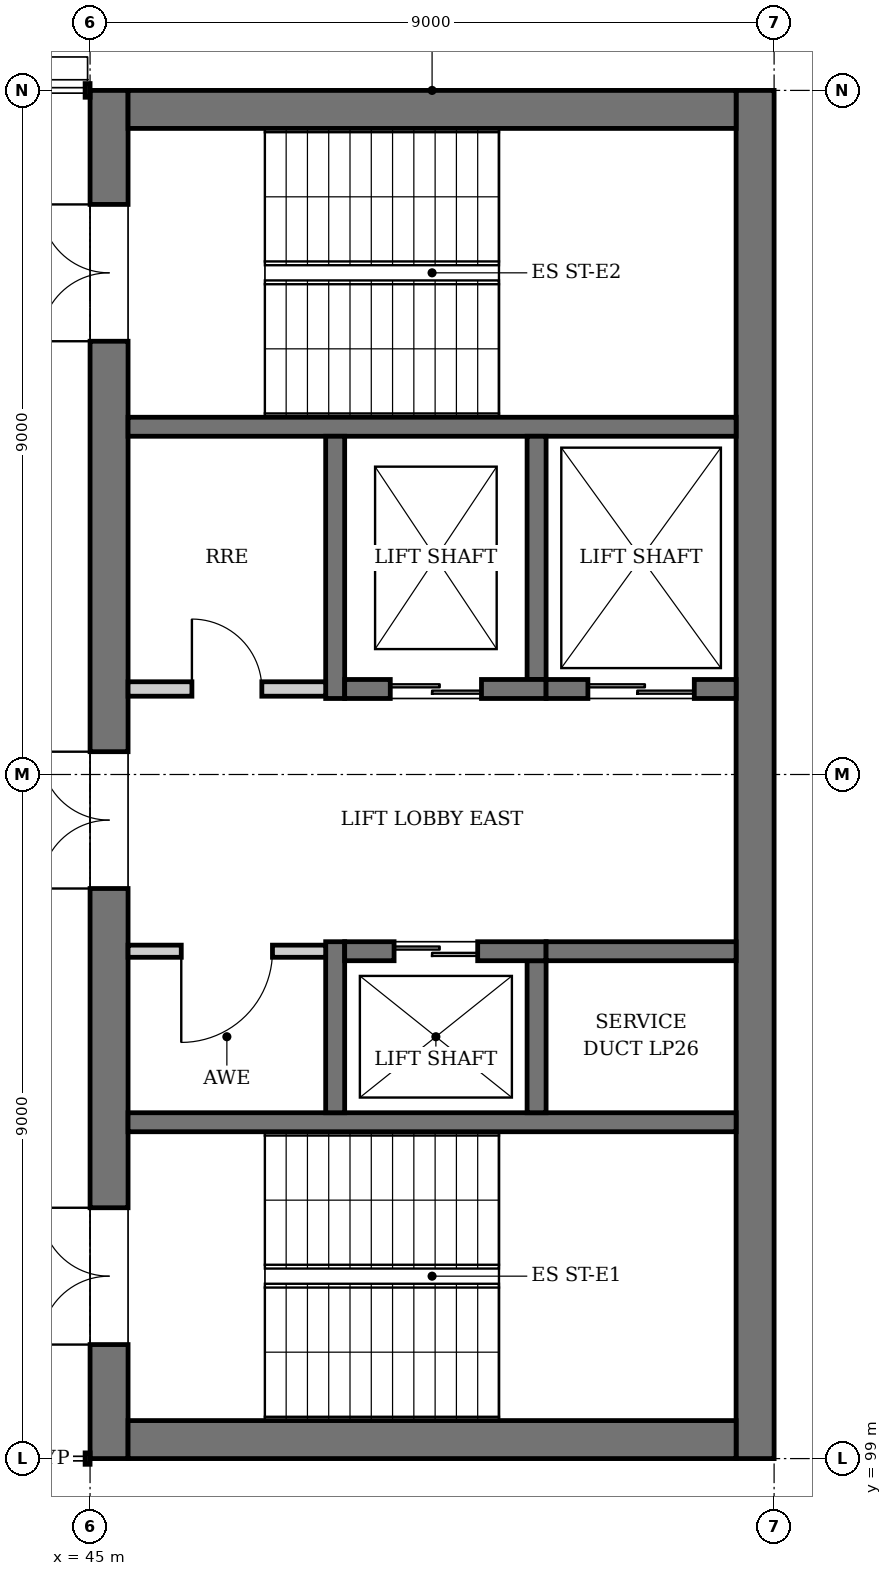
"""IFC4 building model, lengths in metres.
Left out: names, types, materials, properties, quantities, classifications, styles, units other than length and angle.
Written with IfcOpenShell. Run it as: python <this file> out.ifc"""

import sys

from ifc_helpers import new_model, si_unit, direction, frame, frame_2d, origin, place, context, subcontext, project, spatial, rectangle, extrude, element, fill, save


model = new_model("IFC4")
c1 = context("Model", 3, precision=1e-05, world=origin(), true_north=direction((0.0, 1.0)))
c2 = subcontext(c1, "Body", "Model", "MODEL_VIEW")
j1 = project(units=[si_unit("LENGTHUNIT", "METRE"), si_unit("PLANEANGLEUNIT", "RADIAN")], contexts=[c1])
p1 = place(None, origin())
s1 = spatial("IfcSite", under=j1, at=p1, CompositionType="ELEMENT")
p2 = place(p1, origin())
s2 = spatial("IfcBuilding", under=s1, at=p2, CompositionType="ELEMENT")
p3 = place(p2, frame((0.0, 0.0, 59.2)))
s3 = spatial("IfcBuildingStorey", under=s2, at=p3, CompositionType="ELEMENT", Elevation=59.2)
p4 = place(p3, frame((45.25, 99.0, 0.0), z_axis=(0.0, 0.0, 1.0), x_axis=(0.0, 1.0, 0.0)))
e1 = element("IfcWall", 1, at=p4, inside=s3, PredefinedType="SHEAR", context=c2, shape_type="SweptSolid", body=[
    extrude(rectangle(XDim=18.0, YDim=0.5, at=frame_2d((9.0, 0.0))), origin(), (0.0, 0.0, 1.0), 4.0),
])
p5 = place(p4, frame((1.5, 0.0, 0.0)))
e2 = element("IfcOpeningElement", 2, at=p5, cuts=e1, PredefinedType="OPENING", context=c2, shape_type="SweptSolid", body=[
    extrude(rectangle(XDim=1.8, YDim=2.1, at=frame_2d((0.9, 1.05))), frame((0.0, 0.26, 0.0), z_axis=(0.0, -1.0, 0.0), x_axis=(1.0, 0.0, 0.0)), (0.0, 0.0, 1.0), 0.52),
])
p6 = place(p4, frame((14.7, 0.0, 0.0)))
e3 = element("IfcOpeningElement", 3, at=p6, cuts=e1, PredefinedType="OPENING", context=c2, shape_type="SweptSolid", body=[
    extrude(rectangle(XDim=1.8, YDim=2.1, at=frame_2d((0.9, 1.05))), frame((0.0, 0.26, 0.0), z_axis=(0.0, -1.0, 0.0), x_axis=(1.0, 0.0, 0.0)), (0.0, 0.0, 1.0), 0.52),
])
p7 = place(p4, frame((7.5, 0.0, 0.0)))
e4 = element("IfcOpeningElement", 4, at=p7, cuts=e1, PredefinedType="OPENING", context=c2, shape_type="SweptSolid", body=[
    extrude(rectangle(XDim=1.8, YDim=2.1, at=frame_2d((0.9, 1.05))), frame((0.0, 0.26, 0.0), z_axis=(0.0, -1.0, 0.0), x_axis=(1.0, 0.0, 0.0)), (0.0, 0.0, 1.0), 0.52),
])
p8 = place(p3, frame((53.75, 99.0, 0.0), z_axis=(0.0, 0.0, 1.0), x_axis=(0.0, 1.0, 0.0)))
e5 = element("IfcWall", 5, at=p8, inside=s3, PredefinedType="SHEAR", context=c2, shape_type="SweptSolid", body=[
    extrude(rectangle(XDim=18.0, YDim=0.5, at=frame_2d((9.0, 0.0))), origin(), (0.0, 0.0, 1.0), 4.0),
])
for number, where, z_axis, x_axis in (
    (6, (45.5, 99.25, 0.0), (0.0, 0.0, 1.0), (1.0, 0.0, 0.0)),
    (7, (45.5, 116.75, 0.0), (0.0, 0.0, 1.0), (1.0, 0.0, 0.0)),
):
    element("IfcWall", number, at=place(p3, frame(where, z_axis=z_axis, x_axis=x_axis)), inside=s3, PredefinedType="SHEAR", context=c2, shape_type="SweptSolid", body=[
        extrude(rectangle(XDim=8.0, YDim=0.5, at=frame_2d((4.0, 0.0))), origin(), (0.0, 0.0, 1.0), 4.0),
    ])
for number, where, z_axis, x_axis in (
    (8, (45.5, 103.425, 0.0), (0.0, 0.0, 1.0), (1.0, 0.0, 0.0)),
    (9, (45.5, 112.575, 0.0), (0.0, 0.0, 1.0), (1.0, 0.0, 0.0)),
):
    element("IfcWall", number, at=place(p3, frame(where, z_axis=z_axis, x_axis=x_axis)), inside=s3, PredefinedType="SOLIDWALL", context=c2, shape_type="SweptSolid", body=[
        extrude(rectangle(XDim=8.0, YDim=0.25, at=frame_2d((4.0, 0.0))), origin(), (0.0, 0.0, 1.0), 3.75),
    ])
p9 = place(p3, frame((48.225, 103.55, 0.0), z_axis=(0.0, 0.0, 1.0), x_axis=(0.0, 1.0, 0.0)))
e10 = element("IfcWall", 10, at=p9, inside=s3, PredefinedType="SOLIDWALL", context=c2, shape_type="SweptSolid", body=[
    extrude(rectangle(XDim=2.25, YDim=0.25, at=frame_2d((1.125, 0.0))), origin(), (0.0, 0.0, 1.0), 4.0),
])
p10 = place(p3, frame((50.875, 103.55, 0.0), z_axis=(0.0, 0.0, 1.0), x_axis=(0.0, 1.0, 0.0)))
e11 = element("IfcWall", 11, at=p10, inside=s3, PredefinedType="SOLIDWALL", context=c2, shape_type="SweptSolid", body=[
    extrude(rectangle(XDim=2.0, YDim=0.25, at=frame_2d((1.0, 0.0))), origin(), (0.0, 0.0, 1.0), 4.0),
])
p11 = place(p3, frame((48.35, 105.675, 0.0), z_axis=(0.0, 0.0, 1.0), x_axis=(1.0, 0.0, 0.0)))
e12 = element("IfcWall", 12, at=p11, inside=s3, PredefinedType="SOLIDWALL", context=c2, shape_type="SweptSolid", body=[
    extrude(rectangle(XDim=2.65, YDim=0.25, at=frame_2d((1.325, 0.0))), origin(), (0.0, 0.0, 1.0), 4.0),
])
p12 = place(p11, frame((0.65, 0.0, 0.0)))
e13 = element("IfcOpeningElement", 13, at=p12, cuts=e12, PredefinedType="OPENING", context=c2, shape_type="SweptSolid", body=[
    extrude(rectangle(XDim=1.1, YDim=2.1, at=frame_2d((0.55, 1.05))), frame((0.0, 0.135, 0.0), z_axis=(0.0, -1.0, 0.0), x_axis=(1.0, 0.0, 0.0)), (0.0, 0.0, 1.0), 0.27),
])
p13 = place(p3, frame((51.0, 105.675, 0.0), z_axis=(0.0, 0.0, 1.0), x_axis=(1.0, 0.0, 0.0)))
e14 = element("IfcWall", 14, at=p13, inside=s3, PredefinedType="SOLIDWALL", context=c2, shape_type="SweptSolid", body=[
    extrude(rectangle(XDim=2.5, YDim=0.25, at=frame_2d((1.25, 0.0))), origin(), (0.0, 0.0, 1.0), 4.0),
])
p14 = place(p3, frame((48.225, 109.0, 0.0), z_axis=(0.0, 0.0, 1.0), x_axis=(0.0, 1.0, 0.0)))
e15 = element("IfcWall", 15, at=p14, inside=s3, PredefinedType="SOLIDWALL", context=c2, shape_type="SweptSolid", body=[
    extrude(rectangle(XDim=3.45, YDim=0.25, at=frame_2d((1.725, 0.0))), origin(), (0.0, 0.0, 1.0), 4.0),
])
p15 = place(p3, frame((50.875, 109.25, 0.0), z_axis=(0.0, 0.0, 1.0), x_axis=(0.0, 1.0, 0.0)))
e16 = element("IfcWall", 16, at=p15, inside=s3, PredefinedType="SOLIDWALL", context=c2, shape_type="SweptSolid", body=[
    extrude(rectangle(XDim=3.2, YDim=0.25, at=frame_2d((1.6, 0.0))), origin(), (0.0, 0.0, 1.0), 4.0),
])
p16 = place(p3, frame((48.35, 109.125, 0.0), z_axis=(0.0, 0.0, 1.0), x_axis=(1.0, 0.0, 0.0)))
e17 = element("IfcWall", 17, at=p16, inside=s3, PredefinedType="SOLIDWALL", context=c2, shape_type="SweptSolid", body=[
    extrude(rectangle(XDim=2.65, YDim=0.25, at=frame_2d((1.325, 0.0))), origin(), (0.0, 0.0, 1.0), 4.0),
])
p17 = place(p16, frame((0.6, 0.0, 0.0)))
e18 = element("IfcOpeningElement", 18, at=p17, cuts=e17, PredefinedType="OPENING", context=c2, shape_type="SweptSolid", body=[
    extrude(rectangle(XDim=1.2, YDim=2.1, at=frame_2d((0.6, 1.05))), frame((0.0, 0.135, 0.0), z_axis=(0.0, -1.0, 0.0), x_axis=(1.0, 0.0, 0.0)), (0.0, 0.0, 1.0), 0.27),
])
p18 = place(p3, frame((51.0, 109.125, 0.0), z_axis=(0.0, 0.0, 1.0), x_axis=(1.0, 0.0, 0.0)))
e19 = element("IfcWall", 19, at=p18, inside=s3, PredefinedType="SOLIDWALL", context=c2, shape_type="SweptSolid", body=[
    extrude(rectangle(XDim=2.5, YDim=0.25, at=frame_2d((1.25, 0.0))), origin(), (0.0, 0.0, 1.0), 4.0),
])
p19 = place(p18, frame((0.55, 0.0, 0.0)))
e20 = element("IfcOpeningElement", 20, at=p19, cuts=e19, PredefinedType="OPENING", context=c2, shape_type="SweptSolid", body=[
    extrude(rectangle(XDim=1.4, YDim=2.4, at=frame_2d((0.7, 1.2))), frame((0.0, 0.135, 0.0), z_axis=(0.0, -1.0, 0.0), x_axis=(1.0, 0.0, 0.0)), (0.0, 0.0, 1.0), 0.27),
])
p20 = place(p3, frame((45.5, 105.675, 0.0), z_axis=(0.0, 0.0, 1.0), x_axis=(1.0, 0.0, 0.0)))
e21 = element("IfcWall", 21, at=p20, inside=s3, PredefinedType="PARTITIONING", context=c2, shape_type="SweptSolid", body=[
    extrude(rectangle(XDim=2.6, YDim=0.16, at=frame_2d((1.3, 0.0))), origin(), (0.0, 0.0, 1.0), 3.75),
])
p21 = place(p20, frame((0.7, 0.0, 0.0)))
e22 = element("IfcOpeningElement", 22, at=p21, cuts=e21, PredefinedType="OPENING", context=c2, shape_type="SweptSolid", body=[
    extrude(rectangle(XDim=1.2, YDim=2.1, at=frame_2d((0.6, 1.05))), frame((0.0, 0.09, 0.0), z_axis=(0.0, -1.0, 0.0), x_axis=(1.0, 0.0, 0.0)), (0.0, 0.0, 1.0), 0.18),
])
p22 = place(p3, frame((45.5, 109.125, 0.0), z_axis=(0.0, 0.0, 1.0), x_axis=(1.0, 0.0, 0.0)))
e23 = element("IfcWall", 23, at=p22, inside=s3, PredefinedType="PARTITIONING", context=c2, shape_type="SweptSolid", body=[
    extrude(rectangle(XDim=2.6, YDim=0.19, at=frame_2d((1.3, 0.0))), origin(), (0.0, 0.0, 1.0), 3.75),
])
p23 = place(p22, frame((0.84, 0.0, 0.0)))
e24 = element("IfcOpeningElement", 24, at=p23, cuts=e23, PredefinedType="OPENING", context=c2, shape_type="SweptSolid", body=[
    extrude(rectangle(XDim=0.92, YDim=2.1, at=frame_2d((0.46, 1.05))), frame((0.0, 0.105, 0.0), z_axis=(0.0, -1.0, 0.0), x_axis=(1.0, 0.0, 0.0)), (0.0, 0.0, 1.0), 0.21),
])
p24 = place(p12, origin())
e25 = element("IfcDoor", 25, at=p24, inside=s3, OperationType="DOUBLE_DOOR_SLIDING", PredefinedType="DOOR", context=c2, shape_type="SweptSolid", body=[
    extrude(rectangle(XDim=1.1, YDim=2.1, at=frame_2d((0.55, 1.05))), frame((0.0, 0.025, 0.0), z_axis=(0.0, -1.0, 0.0), x_axis=(1.0, 0.0, 0.0)), (0.0, 0.0, 1.0), 0.05),
])
fill(e13, e25)
p25 = place(p17, origin())
e26 = element("IfcDoor", 26, at=p25, inside=s3, OperationType="DOUBLE_DOOR_SLIDING", PredefinedType="DOOR", context=c2, shape_type="SweptSolid", body=[
    extrude(rectangle(XDim=1.2, YDim=2.1, at=frame_2d((0.6, 1.05))), frame((0.0, 0.025, 0.0), z_axis=(0.0, -1.0, 0.0), x_axis=(1.0, 0.0, 0.0)), (0.0, 0.0, 1.0), 0.05),
])
fill(e18, e26)
p26 = place(p19, origin())
e27 = element("IfcDoor", 27, at=p26, inside=s3, OperationType="DOUBLE_DOOR_SLIDING", PredefinedType="DOOR", context=c2, shape_type="SweptSolid", body=[
    extrude(rectangle(XDim=1.4, YDim=2.4, at=frame_2d((0.7, 1.2))), frame((0.0, 0.025, 0.0), z_axis=(0.0, -1.0, 0.0), x_axis=(1.0, 0.0, 0.0)), (0.0, 0.0, 1.0), 0.05),
])
fill(e20, e27)
p27 = place(p5, origin())
e28 = element("IfcDoor", 28, at=p27, inside=s3, OperationType="DOUBLE_DOOR_SINGLE_SWING", PredefinedType="DOOR", context=c2, shape_type="SweptSolid", body=[
    extrude(rectangle(XDim=1.8, YDim=2.1, at=frame_2d((0.9, 1.05))), frame((0.0, 0.025, 0.0), z_axis=(0.0, -1.0, 0.0), x_axis=(1.0, 0.0, 0.0)), (0.0, 0.0, 1.0), 0.05),
])
fill(e2, e28)
p28 = place(p6, origin())
e29 = element("IfcDoor", 29, at=p28, inside=s3, OperationType="DOUBLE_DOOR_SINGLE_SWING", PredefinedType="DOOR", context=c2, shape_type="SweptSolid", body=[
    extrude(rectangle(XDim=1.8, YDim=2.1, at=frame_2d((0.9, 1.05))), frame((0.0, 0.025, 0.0), z_axis=(0.0, -1.0, 0.0), x_axis=(1.0, 0.0, 0.0)), (0.0, 0.0, 1.0), 0.05),
])
fill(e3, e29)
p29 = place(p7, origin())
e30 = element("IfcDoor", 30, at=p29, inside=s3, OperationType="DOUBLE_DOOR_SINGLE_SWING", PredefinedType="DOOR", context=c2, shape_type="SweptSolid", body=[
    extrude(rectangle(XDim=1.8, YDim=2.1, at=frame_2d((0.9, 1.05))), frame((0.0, 0.025, 0.0), z_axis=(0.0, -1.0, 0.0), x_axis=(1.0, 0.0, 0.0)), (0.0, 0.0, 1.0), 0.05),
])
fill(e4, e30)
p30 = place(p21, frame((1.2, 0.0, 0.0), z_axis=(0.0, 0.0, 1.0), x_axis=(-1.0, 0.0, 0.0)))
e31 = element("IfcDoor", 31, at=p30, inside=s3, OperationType="SINGLE_SWING_RIGHT", PredefinedType="DOOR", context=c2, shape_type="SweptSolid", body=[
    extrude(rectangle(XDim=1.2, YDim=2.1, at=frame_2d((0.6, 1.05))), frame((0.0, 0.025, 0.0), z_axis=(0.0, -1.0, 0.0), x_axis=(1.0, 0.0, 0.0)), (0.0, 0.0, 1.0), 0.05),
])
fill(e22, e31)
p31 = place(p23, origin())
e32 = element("IfcDoor", 32, at=p31, inside=s3, OperationType="SINGLE_SWING_LEFT", PredefinedType="DOOR", context=c2, shape_type="SweptSolid", body=[
    extrude(rectangle(XDim=0.92, YDim=2.1, at=frame_2d((0.46, 1.05))), frame((0.0, 0.025, 0.0), z_axis=(0.0, -1.0, 0.0), x_axis=(1.0, 0.0, 0.0)), (0.0, 0.0, 1.0), 0.05),
])
fill(e24, e32)
save(model, sys.argv[1])
